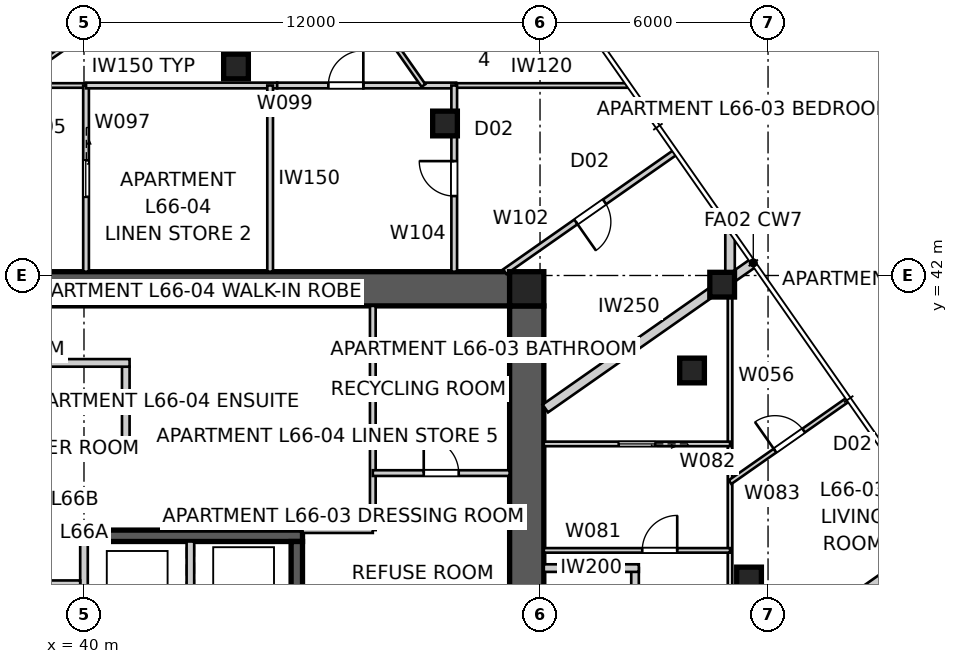
"""IFC4 building model, lengths in metres.
Left out: names, types, materials, properties, quantities, classifications, styles, units other than length and angle.
Written with IfcOpenShell. Run it as: python <this file> out.ifc"""

import sys

from ifc_helpers import new_model, si_unit, direction, frame, frame_2d, origin, origin_2d, place, context, subcontext, project, spatial, polyline, rectangle, outline, extrude, element, fill, save


model = new_model("IFC4")
c1 = context("Model", 3, precision=1e-05, world=origin(), true_north=direction((0.0, 1.0)))
c2 = subcontext(c1, "Body", "Model", "MODEL_VIEW")
j1 = project(units=[si_unit("LENGTHUNIT", "METRE"), si_unit("PLANEANGLEUNIT", "RADIAN")], contexts=[c1])
p1 = place(None, origin())
s1 = spatial("IfcSite", under=j1, at=p1, CompositionType="ELEMENT")
p2 = place(p1, origin())
s2 = spatial("IfcBuilding", under=s1, at=p2, CompositionType="ELEMENT")
p3 = place(p2, frame((0.0, 0.0, 240.4)))
s3 = spatial("IfcBuildingStorey", under=s2, at=p3, CompositionType="ELEMENT", Elevation=240.4)
p4 = place(p3, frame((28.8, 41.65, 0.0), z_axis=(0.0, 0.0, 1.0), x_axis=(1.0, 0.0, 0.0)))
e1 = element("IfcWall", 1, at=p4, inside=s3, PredefinedType="SHEAR", context=c2, shape_type="SweptSolid", body=[
    extrude(outline(polyline([(0.0, -0.45), (22.4, -0.45), (22.4, -0.025), (22.85, -0.025), (22.85, 0.025), (22.4, 0.025), (22.4, 0.45), (0.0, 0.45), (0.0, 0.025), (-0.45, 0.025), (-0.45, -0.025), (0.0, -0.025), (0.0, -0.45)])), origin(), (0.0, 0.0, 1.0), 3.4),
])
p5 = place(p3, frame((51.65, 18.8, 0.0), z_axis=(0.0, 0.0, 1.0), x_axis=(0.0, 1.0, 0.0)))
e2 = element("IfcWall", 2, at=p5, inside=s3, PredefinedType="SHEAR", context=c2, shape_type="SweptSolid", body=[
    extrude(outline(polyline([(0.0, -0.45), (22.4, -0.45), (22.4, -0.025), (22.85, -0.025), (22.85, 0.025), (22.4, 0.025), (22.4, 0.45), (0.0, 0.45), (0.0, 0.025), (-0.45, 0.025), (-0.45, -0.025), (0.0, -0.025), (0.0, -0.45)])), origin(), (0.0, 0.0, 1.0), 3.4),
])
p6 = place(p5, frame((11.14, 0.0, 0.0)))
e3 = element("IfcOpeningElement", 3, at=p6, cuts=e2, PredefinedType="OPENING", context=c2, shape_type="SweptSolid", body=[
    extrude(rectangle(XDim=1.02, YDim=2.4, at=frame_2d((0.51, 1.2))), frame((0.0, 0.46, 0.0), z_axis=(0.0, -1.0, 0.0), x_axis=(1.0, 0.0, 0.0)), (0.0, 0.0, 1.0), 0.92),
])
p7 = place(p3, frame((34.25, 35.15, 0.0), z_axis=(0.0, 0.0, 1.0), x_axis=(1.0, 0.0, 0.0)))
e4 = element("IfcWall", 4, at=p7, inside=s3, PredefinedType="SHEAR", context=c2, shape_type="SweptSolid", body=[
    extrude(rectangle(XDim=11.5, YDim=0.3, at=frame_2d((5.75, 0.0))), origin(), (0.0, 0.0, 1.0), 3.4),
])
for number, where, z_axis, x_axis in (
    (5, (40.0, 32.2, 0.0), (0.0, 0.0, 1.0), (0.0, 1.0, 0.0)),
    (6, (42.8, 32.2, 0.0), (0.0, 0.0, 1.0), (0.0, 1.0, 0.0)),
):
    element("IfcWall", number, at=place(p3, frame(where, z_axis=z_axis, x_axis=x_axis)), inside=s3, PredefinedType="SOLIDWALL", context=c2, shape_type="SweptSolid", body=[
        extrude(rectangle(XDim=2.8, YDim=0.2, at=frame_2d((1.4, 0.0))), origin(), (0.0, 0.0, 1.0), 3.4),
    ])
p8 = place(p3, frame((45.6, 32.2, 0.0), z_axis=(0.0, 0.0, 1.0), x_axis=(0.0, 1.0, 0.0)))
e7 = element("IfcWall", 7, at=p8, inside=s3, PredefinedType="SHEAR", context=c2, shape_type="SweptSolid", body=[
    extrude(rectangle(XDim=2.8, YDim=0.3, at=frame_2d((1.4, 0.0))), origin(), (0.0, 0.0, 1.0), 3.4),
])
p9 = place(p3, frame((41.1, 37.6, 0.0), z_axis=(0.0, 0.0, 1.0), x_axis=(0.0, 1.0, 0.0)))
e8 = element("IfcWall", 8, at=p9, inside=s3, PredefinedType="SOLIDWALL", context=c2, shape_type="SweptSolid", body=[
    extrude(rectangle(XDim=2.0, YDim=0.2, at=frame_2d((1.0, 0.0))), origin(), (0.0, 0.0, 1.0), 3.4),
])
for number, where, z_axis, x_axis in (
    (9, (38.8, 37.5, 0.0), (0.0, 0.0, 1.0), (1.0, 0.0, 0.0)),
    (10, (38.8, 39.7, 0.0), (0.0, 0.0, 1.0), (1.0, 0.0, 0.0)),
):
    element("IfcWall", number, at=place(p3, frame(where, z_axis=z_axis, x_axis=x_axis)), inside=s3, PredefinedType="SOLIDWALL", context=c2, shape_type="SweptSolid", body=[
        extrude(rectangle(XDim=2.4, YDim=0.2, at=frame_2d((1.2, 0.0))), origin(), (0.0, 0.0, 1.0), 3.4),
    ])
p10 = place(p3, frame((51.65, 41.65, 0.0), z_axis=(0.0, 0.0, 1.0), x_axis=(1.0, 0.0, 0.0)))
e11 = element("IfcColumn", 11, at=p10, inside=s3, PredefinedType="COLUMN", context=c2, shape_type="SweptSolid", body=[
    extrude(rectangle(XDim=0.9, YDim=0.9, at=origin_2d()), origin(), (0.0, 0.0, 1.0), 3.4),
])
p11 = place(p3, frame((56.793, 41.758, -0.15), z_axis=(0.0, 0.0, 1.0), x_axis=(1.0, 0.0, 0.0)))
e12 = element("IfcColumn", 12, at=p11, inside=s3, PredefinedType="COLUMN", context=c2, shape_type="SweptSolid", body=[
    extrude(rectangle(XDim=0.65, YDim=0.65, at=origin_2d()), origin(), (0.0, 0.0, 1.0), 3.55),
])
for number, where, z_axis, x_axis in (
    (13, (57.5, 34.0, 0.0), (0.0, 0.0, 1.0), (1.0, 0.0, 0.0)),
    (14, (56.0, 39.5, 0.0), (0.0, 0.0, 1.0), (1.0, 0.0, 0.0)),
    (15, (49.5, 46.0, 0.0), (0.0, 0.0, 1.0), (1.0, 0.0, 0.0)),
    (16, (44.0, 47.5, 0.0), (0.0, 0.0, 1.0), (1.0, 0.0, 0.0)),
):
    element("IfcColumn", number, at=place(p3, frame(where, z_axis=z_axis, x_axis=x_axis)), inside=s3, PredefinedType="COLUMN", context=c2, shape_type="SweptSolid", body=[
        extrude(rectangle(XDim=0.65, YDim=0.65, at=origin_2d()), origin(), (0.0, 0.0, 1.0), 3.4),
    ])
p12 = place(p3, frame((54.5, 25.7, 0.0), z_axis=(0.0, 0.0, 1.0), x_axis=(0.0, 1.0, 0.0)))
e17 = element("IfcWall", 17, at=p12, inside=s3, PredefinedType="PARTITIONING", context=c2, shape_type="SweptSolid", body=[
    extrude(rectangle(XDim=8.6, YDim=0.2, at=frame_2d((4.3, 0.0))), origin(), (0.0, 0.0, 1.0), 3.25),
])
p13 = place(p12, frame((5.438, 0.0, 0.0)))
e18 = element("IfcOpeningElement", 18, at=p13, cuts=e17, PredefinedType="OPENING", context=c2, shape_type="SweptSolid", body=[
    extrude(rectangle(XDim=1.02, YDim=2.34, at=frame_2d((0.51, 1.17))), frame((0.0, 0.11, 0.0), z_axis=(0.0, -1.0, 0.0), x_axis=(1.0, 0.0, 0.0)), (0.0, 0.0, 1.0), 0.22),
])
p14 = place(p12, frame((1.543, 0.0, 0.0)))
e19 = element("IfcOpeningElement", 19, at=p14, cuts=e17, PredefinedType="OPENING", context=c2, shape_type="SweptSolid", body=[
    extrude(rectangle(XDim=1.02, YDim=2.34, at=frame_2d((0.51, 1.17))), frame((0.0, 0.11, 0.0), z_axis=(0.0, -1.0, 0.0), x_axis=(1.0, 0.0, 0.0)), (0.0, 0.0, 1.0), 0.22),
])
p15 = place(p3, frame((52.1, 34.3, 0.0), z_axis=(0.0, 0.0, 1.0), x_axis=(1.0, 0.0, 0.0)))
e20 = element("IfcWall", 20, at=p15, inside=s3, PredefinedType="PARTITIONING", context=c2, shape_type="SweptSolid", body=[
    extrude(rectangle(XDim=2.5, YDim=0.2, at=frame_2d((1.25, 0.0))), origin(), (0.0, 0.0, 1.0), 3.25),
])
p16 = place(p3, frame((57.612, 42.332, 0.0), z_axis=(0.0, 0.0, 1.0), x_axis=(-0.819161528122, -0.573562891796, 0.0)))
e21 = element("IfcWall", 21, at=p16, inside=s3, PredefinedType="PARTITIONING", context=c2, shape_type="SweptSolid", body=[
    extrude(rectangle(XDim=6.681, YDim=0.25, at=frame_2d((3.341, 0.0))), origin(), (0.0, 0.0, 1.0), 3.25),
])
p17 = place(p3, frame((62.631, 35.164, 0.0), z_axis=(0.0, 0.0, 1.0), x_axis=(-0.81915902312, -0.573566469418, 0.0)))
e22 = element("IfcWall", 22, at=p17, inside=s3, PredefinedType="PARTITIONING", context=c2, shape_type="SweptSolid", body=[
    extrude(rectangle(XDim=9.756, YDim=0.25, at=frame_2d((4.878, 0.0))), origin(), (0.0, 0.0, 1.0), 3.25),
])
p18 = place(p3, frame((47.6, 41.2, 0.0), z_axis=(0.0, 0.0, 1.0), x_axis=(0.0, -1.0, 0.0)))
e23 = element("IfcWall", 23, at=p18, inside=s3, PredefinedType="SOLIDWALL", context=c2, shape_type="SweptSolid", body=[
    extrude(rectangle(XDim=5.9, YDim=0.15, at=frame_2d((2.95, 0.0))), origin(), (0.0, 0.0, 1.0), 3.25),
])
p19 = place(p3, frame((47.6, 35.3, 0.0), z_axis=(0.0, 0.0, 1.0), x_axis=(-1.0, 0.0, 0.0)))
e24 = element("IfcWall", 24, at=p19, inside=s3, PredefinedType="SOLIDWALL", context=c2, shape_type="SweptSolid", body=[
    extrude(rectangle(XDim=1.85, YDim=0.15, at=frame_2d((0.925, 0.0))), origin(), (0.0, 0.0, 1.0), 3.25),
])
p20 = place(p3, frame((47.6, 36.8, 0.0), z_axis=(0.0, 0.0, 1.0), x_axis=(1.0, 0.0, 0.0)))
e25 = element("IfcWall", 25, at=p20, inside=s3, PredefinedType="SOLIDWALL", context=c2, shape_type="SweptSolid", body=[
    extrude(rectangle(XDim=3.6, YDim=0.15, at=frame_2d((1.8, 0.0))), origin(), (0.0, 0.0, 1.0), 3.25),
])
p21 = place(p20, frame((1.34, 0.0, 0.0)))
e26 = element("IfcOpeningElement", 26, at=p21, cuts=e25, PredefinedType="OPENING", context=c2, shape_type="SweptSolid", body=[
    extrude(rectangle(XDim=0.92, YDim=2.1, at=frame_2d((0.46, 1.05))), frame((0.0, 0.085, 0.0), z_axis=(0.0, -1.0, 0.0), x_axis=(1.0, 0.0, 0.0)), (0.0, 0.0, 1.0), 0.17),
])
p22 = place(p3, frame((57.0, 41.904, 0.0), z_axis=(0.0, 0.0, 1.0), x_axis=(0.0, -1.0, 0.0)))
e27 = element("IfcWall", 27, at=p22, inside=s3, PredefinedType="PARTITIONING", context=c2, shape_type="SweptSolid", body=[
    extrude(rectangle(XDim=20.498, YDim=0.12, at=frame_2d((10.249, 0.0))), origin(), (0.0, 0.0, 1.0), 2.55),
])
p23 = place(p22, frame((8.449, 0.0, 0.0)))
e28 = element("IfcOpeningElement", 28, at=p23, cuts=e27, PredefinedType="OPENING", context=c2, shape_type="SweptSolid", body=[
    extrude(rectangle(XDim=0.92, YDim=2.34, at=frame_2d((0.46, 1.17))), frame((0.0, 0.07, 0.0), z_axis=(0.0, -1.0, 0.0), x_axis=(1.0, 0.0, 0.0)), (0.0, 0.0, 1.0), 0.14),
])
p24 = place(p22, frame((11.574, 0.0, 0.0)))
e29 = element("IfcOpeningElement", 29, at=p24, cuts=e27, PredefinedType="OPENING", context=c2, shape_type="SweptSolid", body=[
    extrude(rectangle(XDim=0.92, YDim=2.34, at=frame_2d((0.46, 1.17))), frame((0.0, 0.07, 0.0), z_axis=(0.0, -1.0, 0.0), x_axis=(1.0, 0.0, 0.0)), (0.0, 0.0, 1.0), 0.14),
])
p25 = place(p22, frame((18.432, 0.0, 0.0)))
e30 = element("IfcOpeningElement", 30, at=p25, cuts=e27, PredefinedType="OPENING", context=c2, shape_type="SweptSolid", body=[
    extrude(rectangle(XDim=0.92, YDim=2.34, at=frame_2d((0.46, 1.17))), frame((0.0, 0.07, 0.0), z_axis=(0.0, -1.0, 0.0), x_axis=(1.0, 0.0, 0.0)), (0.0, 0.0, 1.0), 0.14),
])
p26 = place(p3, frame((52.1, 34.766, 0.0), z_axis=(0.0, 0.0, 1.0), x_axis=(1.0, 0.0, 0.0)))
e31 = element("IfcWall", 31, at=p26, inside=s3, PredefinedType="PARTITIONING", context=c2, shape_type="SweptSolid", body=[
    extrude(rectangle(XDim=4.9, YDim=0.12, at=frame_2d((2.45, 0.0))), origin(), (0.0, 0.0, 1.0), 3.25),
])
p27 = place(p26, frame((2.59, 0.0, 0.0)))
e32 = element("IfcOpeningElement", 32, at=p27, cuts=e31, PredefinedType="OPENING", context=c2, shape_type="SweptSolid", body=[
    extrude(rectangle(XDim=0.92, YDim=2.34, at=frame_2d((0.46, 1.17))), frame((0.0, 0.07, 0.0), z_axis=(0.0, -1.0, 0.0), x_axis=(1.0, 0.0, 0.0)), (0.0, 0.0, 1.0), 0.14),
])
p28 = place(p3, frame((57.0, 37.568, 0.0), z_axis=(0.0, 0.0, 1.0), x_axis=(-1.0, 0.0, 0.0)))
e33 = element("IfcWall", 33, at=p28, inside=s3, PredefinedType="PARTITIONING", context=c2, shape_type="SweptSolid", body=[
    extrude(rectangle(XDim=4.9, YDim=0.12, at=frame_2d((2.45, 0.0))), origin(), (0.0, 0.0, 1.0), 3.25),
])
p29 = place(p28, frame((1.97, 0.0, 0.0)))
e34 = element("IfcOpeningElement", 34, at=p29, cuts=e33, PredefinedType="OPENING", context=c2, shape_type="SweptSolid", body=[
    extrude(rectangle(XDim=0.96, YDim=2.1, at=frame_2d((0.48, 1.05))), frame((0.0, 0.07, 0.0), z_axis=(0.0, -1.0, 0.0), x_axis=(1.0, 0.0, 0.0)), (0.0, 0.0, 1.0), 0.14),
])
p30 = place(p3, frame((57.0, 36.562, 0.0), z_axis=(0.0, 0.0, 1.0), x_axis=(0.819140645834, 0.573592714688, 0.0)))
e35 = element("IfcWall", 35, at=p30, inside=s3, PredefinedType="PARTITIONING", context=c2, shape_type="SweptSolid", body=[
    extrude(rectangle(XDim=3.77, YDim=0.12, at=frame_2d((1.885, 0.0))), origin(), (0.0, 0.0, 1.0), 3.25),
])
p31 = place(p30, frame((1.445, 0.0, 0.0)))
e36 = element("IfcOpeningElement", 36, at=p31, cuts=e35, PredefinedType="OPENING", context=c2, shape_type="SweptSolid", body=[
    extrude(rectangle(XDim=0.92, YDim=2.34, at=frame_2d((0.46, 1.17))), frame((0.0, 0.07, 0.0), z_axis=(0.0, -1.0, 0.0), x_axis=(1.0, 0.0, 0.0)), (0.0, 0.0, 1.0), 0.14),
])
p32 = place(p3, frame((57.0, 41.919, 0.0), z_axis=(0.0, 0.0, 1.0), x_axis=(0.0, 1.0, 0.0)))
e37 = element("IfcWall", 37, at=p32, inside=s3, PredefinedType="PARTITIONING", context=c2, shape_type="SweptSolid", body=[
    extrude(rectangle(XDim=1.217, YDim=0.25, at=frame_2d((0.608, 0.0))), origin(), (0.0, 0.0, 1.0), 3.25),
])
p33 = place(p3, frame((28.708, 47.0, 0.0), z_axis=(0.0, 0.0, 1.0), x_axis=(1.0, 0.0, 0.0)))
e38 = element("IfcWall", 38, at=p33, inside=s3, PredefinedType="PARTITIONING", context=c2, shape_type="SweptSolid", body=[
    extrude(rectangle(XDim=11.346, YDim=0.12, at=frame_2d((5.673, 0.0))), origin(), (0.0, 0.0, 1.0), 2.55),
])
p34 = place(p33, frame((0.477, 0.0, 0.0)))
e39 = element("IfcOpeningElement", 39, at=p34, cuts=e38, PredefinedType="OPENING", context=c2, shape_type="SweptSolid", body=[
    extrude(rectangle(XDim=0.92, YDim=2.34, at=frame_2d((0.46, 1.17))), frame((0.0, 0.07, 0.0), z_axis=(0.0, -1.0, 0.0), x_axis=(1.0, 0.0, 0.0)), (0.0, 0.0, 1.0), 0.14),
])
p35 = place(p3, frame((40.054, 47.0, 0.0), z_axis=(0.0, 0.0, 1.0), x_axis=(0.0, -1.0, 0.0)))
e40 = element("IfcWall", 40, at=p35, inside=s3, PredefinedType="SOLIDWALL", context=c2, shape_type="SweptSolid", body=[
    extrude(rectangle(XDim=4.9, YDim=0.15, at=frame_2d((2.45, 0.0))), origin(), (0.0, 0.0, 1.0), 2.796),
])
p36 = place(p35, frame((1.97, 0.0, 0.0)))
e41 = element("IfcOpeningElement", 41, at=p36, cuts=e40, PredefinedType="OPENING", context=c2, shape_type="SweptSolid", body=[
    extrude(rectangle(XDim=0.96, YDim=2.1, at=frame_2d((0.48, 1.05))), frame((0.0, 0.085, 0.0), z_axis=(0.0, -1.0, 0.0), x_axis=(1.0, 0.0, 0.0)), (0.0, 0.0, 1.0), 0.17),
])
p37 = place(p3, frame((40.054, 47.0, 0.0), z_axis=(0.0, 0.0, 1.0), x_axis=(1.0, 0.0, 0.0)))
e42 = element("IfcWall", 42, at=p37, inside=s3, PredefinedType="SOLIDWALL", context=c2, shape_type="SweptSolid", body=[
    extrude(rectangle(XDim=5.029, YDim=0.15, at=frame_2d((2.515, 0.0))), origin(), (0.0, 0.0, 1.0), 3.25),
])
p38 = place(p3, frame((45.083, 47.0, 0.0), z_axis=(0.0, 0.0, 1.0), x_axis=(1.0, 0.0, 0.0)))
e43 = element("IfcWall", 43, at=p38, inside=s3, PredefinedType="SOLIDWALL", context=c2, shape_type="SweptSolid", body=[
    extrude(rectangle(XDim=2.267, YDim=0.15, at=frame_2d((1.133, 0.0))), origin(), (0.0, 0.0, 1.0), 2.55),
])
p39 = place(p38, frame((1.347, 0.0, 0.0)))
e44 = element("IfcOpeningElement", 44, at=p39, cuts=e43, PredefinedType="OPENING", context=c2, shape_type="SweptSolid", body=[
    extrude(rectangle(XDim=0.92, YDim=2.34, at=frame_2d((0.46, 1.17))), frame((0.0, 0.085, 0.0), z_axis=(0.0, -1.0, 0.0), x_axis=(1.0, 0.0, 0.0)), (0.0, 0.0, 1.0), 0.17),
])
p40 = place(p3, frame((47.35, 47.0, 0.0), z_axis=(0.0, 0.0, 1.0), x_axis=(1.0, 0.0, 0.0)))
e45 = element("IfcWall", 45, at=p40, inside=s3, PredefinedType="SOLIDWALL", context=c2, shape_type="SweptSolid", body=[
    extrude(rectangle(XDim=2.442, YDim=0.15, at=frame_2d((1.221, 0.0))), origin(), (0.0, 0.0, 1.0), 3.25),
])
p41 = place(p3, frame((44.898, 47.0, 0.0), z_axis=(0.0, 0.0, 1.0), x_axis=(0.0, -1.0, 0.0)))
e46 = element("IfcWall", 46, at=p41, inside=s3, PredefinedType="SOLIDWALL", context=c2, shape_type="SweptSolid", body=[
    extrude(rectangle(XDim=4.9, YDim=0.15, at=frame_2d((2.45, 0.0))), origin(), (0.0, 0.0, 1.0), 3.25),
])
p42 = place(p3, frame((55.537, 45.226, 0.0), z_axis=(0.0, 0.0, 1.0), x_axis=(-0.819158250207, -0.573567573279, 0.0)))
e47 = element("IfcWall", 47, at=p42, inside=s3, PredefinedType="SOLIDWALL", context=c2, shape_type="SweptSolid", body=[
    extrude(rectangle(XDim=5.45, YDim=0.15, at=frame_2d((2.725, 0.0))), origin(), (0.0, 0.0, 1.0), 3.25),
])
p43 = place(p42, frame((2.245, 0.0, 0.0)))
e48 = element("IfcOpeningElement", 48, at=p43, cuts=e47, PredefinedType="OPENING", context=c2, shape_type="SweptSolid", body=[
    extrude(rectangle(XDim=0.92, YDim=2.34, at=frame_2d((0.46, 1.17))), frame((0.0, 0.085, 0.0), z_axis=(0.0, -1.0, 0.0), x_axis=(1.0, 0.0, 0.0)), (0.0, 0.0, 1.0), 0.17),
])
p44 = place(p3, frame((49.792, 47.0, 0.0), z_axis=(0.0, 0.0, 1.0), x_axis=(1.0, 0.0, 0.0)))
e49 = element("IfcWall", 49, at=p44, inside=s3, PredefinedType="PARTITIONING", context=c2, shape_type="SweptSolid", body=[
    extrude(rectangle(XDim=4.502, YDim=0.12, at=frame_2d((2.251, 0.0))), origin(), (0.0, 0.0, 1.0), 3.25),
])
p45 = place(p3, frame((49.742, 42.1, 0.0), z_axis=(0.0, 0.0, 1.0), x_axis=(0.0, 1.0, 0.0)))
e50 = element("IfcWall", 50, at=p45, inside=s3, PredefinedType="SOLIDWALL", context=c2, shape_type="SweptSolid", body=[
    extrude(rectangle(XDim=4.9, YDim=0.15, at=frame_2d((2.45, 0.0))), origin(), (0.0, 0.0, 1.0), 3.25),
])
p46 = place(p45, frame((1.99, 0.0, 0.0)))
e51 = element("IfcOpeningElement", 51, at=p46, cuts=e50, PredefinedType="OPENING", context=c2, shape_type="SweptSolid", body=[
    extrude(rectangle(XDim=0.92, YDim=2.34, at=frame_2d((0.46, 1.17))), frame((0.0, 0.085, 0.0), z_axis=(0.0, -1.0, 0.0), x_axis=(1.0, 0.0, 0.0)), (0.0, 0.0, 1.0), 0.17),
])
p47 = place(p3, frame((48.949, 54.633, 0.0), z_axis=(0.0, 0.0, 1.0), x_axis=(-0.819155207289, -0.573571919092, 0.0)))
e52 = element("IfcWall", 52, at=p47, inside=s3, PredefinedType="PARTITIONING", context=c2, shape_type="SweptSolid", body=[
    extrude(rectangle(XDim=12.71, YDim=0.12, at=frame_2d((6.355, 0.0))), origin(), (0.0, 0.0, 1.0), 3.25),
])
p48 = place(p47, frame((8.066, 0.0, 0.0)))
e53 = element("IfcOpeningElement", 53, at=p48, cuts=e52, PredefinedType="OPENING", context=c2, shape_type="SweptSolid", body=[
    extrude(rectangle(XDim=0.92, YDim=2.34, at=frame_2d((0.46, 1.17))), frame((0.0, 0.07, 0.0), z_axis=(0.0, -1.0, 0.0), x_axis=(1.0, 0.0, 0.0)), (0.0, 0.0, 1.0), 0.14),
])
p49 = place(p47, frame((1.741, 0.0, 0.0)))
e54 = element("IfcOpeningElement", 54, at=p49, cuts=e52, PredefinedType="OPENING", context=c2, shape_type="SweptSolid", body=[
    extrude(rectangle(XDim=0.92, YDim=2.34, at=frame_2d((0.46, 1.17))), frame((0.0, 0.07, 0.0), z_axis=(0.0, -1.0, 0.0), x_axis=(1.0, 0.0, 0.0)), (0.0, 0.0, 1.0), 0.14),
])
p50 = place(p3, frame((48.932, 47.0, 0.0), z_axis=(0.0, 0.0, 1.0), x_axis=(-0.573569946952, 0.819156588177, 0.0)))
e55 = element("IfcWall", 55, at=p50, inside=s3, PredefinedType="PARTITIONING", context=c2, shape_type="SweptSolid", body=[
    extrude(rectangle(XDim=6.243, YDim=0.12, at=frame_2d((3.122, 0.0))), origin(), (0.0, 0.0, 1.0), 3.25),
])
p51 = place(p3, frame((34.55, 33.9, 0.0), z_axis=(0.0, 0.0, 1.0), x_axis=(1.0, 0.0, 0.0)))
e56 = element("IfcWall", 56, at=p51, inside=s3, PredefinedType="SOLIDWALL", context=c2, shape_type="SweptSolid", body=[
    extrude(rectangle(XDim=5.35, YDim=0.15, at=frame_2d((2.675, 0.0))), origin(), (0.0, 0.0, 1.0), 3.25),
])
p52 = place(p51, frame((2.215, 0.0, 0.0)))
e57 = element("IfcOpeningElement", 57, at=p52, cuts=e56, PredefinedType="OPENING", context=c2, shape_type="SweptSolid", body=[
    extrude(rectangle(XDim=0.92, YDim=2.1, at=frame_2d((0.46, 1.05))), frame((0.0, 0.085, 0.0), z_axis=(0.0, -1.0, 0.0), x_axis=(1.0, 0.0, 0.0)), (0.0, 0.0, 1.0), 0.17),
])
p53 = place(p21, origin())
e58 = element("IfcDoor", 58, at=p53, inside=s3, OperationType="SINGLE_SWING_LEFT", PredefinedType="DOOR", context=c2, shape_type="SweptSolid", body=[
    extrude(rectangle(XDim=0.92, YDim=2.1, at=frame_2d((0.46, 1.05))), frame((0.0, 0.025, 0.0), z_axis=(0.0, -1.0, 0.0), x_axis=(1.0, 0.0, 0.0)), (0.0, 0.0, 1.0), 0.05),
])
fill(e26, e58)
p54 = place(p27, origin())
e59 = element("IfcDoor", 59, at=p54, inside=s3, OperationType="SINGLE_SWING_RIGHT", PredefinedType="DOOR", context=c2, shape_type="SweptSolid", body=[
    extrude(rectangle(XDim=0.92, YDim=2.34, at=frame_2d((0.46, 1.17))), frame((0.0, 0.025, 0.0), z_axis=(0.0, -1.0, 0.0), x_axis=(1.0, 0.0, 0.0)), (0.0, 0.0, 1.0), 0.05),
])
fill(e32, e59)
p55 = place(p29, origin())
e60 = element("IfcDoor", 60, at=p55, inside=s3, OperationType="SLIDING_TO_LEFT", PredefinedType="DOOR", context=c2, shape_type="SweptSolid", body=[
    extrude(rectangle(XDim=0.96, YDim=2.1, at=frame_2d((0.48, 1.05))), frame((0.0, 0.025, 0.0), z_axis=(0.0, -1.0, 0.0), x_axis=(1.0, 0.0, 0.0)), (0.0, 0.0, 1.0), 0.05),
])
fill(e34, e60)
p56 = place(p31, origin())
e61 = element("IfcDoor", 61, at=p56, inside=s3, OperationType="SINGLE_SWING_LEFT", PredefinedType="DOOR", context=c2, shape_type="SweptSolid", body=[
    extrude(rectangle(XDim=0.92, YDim=2.34, at=frame_2d((0.46, 1.17))), frame((0.0, 0.025, 0.0), z_axis=(0.0, -1.0, 0.0), x_axis=(1.0, 0.0, 0.0)), (0.0, 0.0, 1.0), 0.05),
])
fill(e36, e61)
p57 = place(p36, origin())
e62 = element("IfcDoor", 62, at=p57, inside=s3, OperationType="SLIDING_TO_LEFT", PredefinedType="DOOR", context=c2, shape_type="SweptSolid", body=[
    extrude(rectangle(XDim=0.96, YDim=2.1, at=frame_2d((0.48, 1.05))), frame((0.0, 0.025, 0.0), z_axis=(0.0, -1.0, 0.0), x_axis=(1.0, 0.0, 0.0)), (0.0, 0.0, 1.0), 0.05),
])
fill(e41, e62)
p58 = place(p39, origin())
e63 = element("IfcDoor", 63, at=p58, inside=s3, OperationType="SINGLE_SWING_RIGHT", PredefinedType="DOOR", context=c2, shape_type="SweptSolid", body=[
    extrude(rectangle(XDim=0.92, YDim=2.34, at=frame_2d((0.46, 1.17))), frame((0.0, 0.025, 0.0), z_axis=(0.0, -1.0, 0.0), x_axis=(1.0, 0.0, 0.0)), (0.0, 0.0, 1.0), 0.05),
])
fill(e44, e63)
p59 = place(p46, origin())
e64 = element("IfcDoor", 64, at=p59, inside=s3, OperationType="SINGLE_SWING_RIGHT", PredefinedType="DOOR", context=c2, shape_type="SweptSolid", body=[
    extrude(rectangle(XDim=0.92, YDim=2.34, at=frame_2d((0.46, 1.17))), frame((0.0, 0.025, 0.0), z_axis=(0.0, -1.0, 0.0), x_axis=(1.0, 0.0, 0.0)), (0.0, 0.0, 1.0), 0.05),
])
fill(e51, e64)
p60 = place(p43, origin())
e65 = element("IfcDoor", 65, at=p60, inside=s3, OperationType="SINGLE_SWING_RIGHT", PredefinedType="DOOR", context=c2, shape_type="SweptSolid", body=[
    extrude(rectangle(XDim=0.92, YDim=2.34, at=frame_2d((0.46, 1.17))), frame((0.0, 0.025, 0.0), z_axis=(0.0, -1.0, 0.0), x_axis=(1.0, 0.0, 0.0)), (0.0, 0.0, 1.0), 0.05),
])
fill(e48, e65)
save(model, sys.argv[1])
